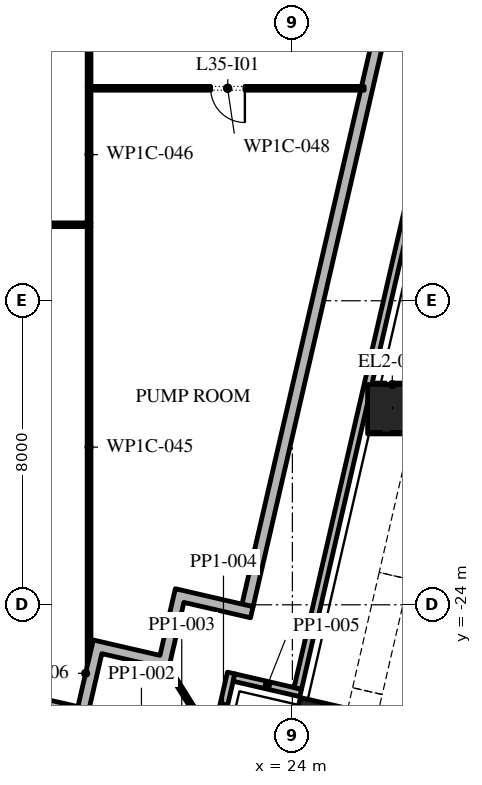
"""IFC4 building model, lengths in metres.
Left out: names, types, materials, properties, quantities, classifications, styles, units other than length and angle.
Written with IfcOpenShell. Run it as: python <this file> out.ifc"""

import sys

from ifc_helpers import new_model, si_unit, direction, frame, frame_2d, origin, origin_2d, place, context, subcontext, project, spatial, polyline, rectangle, outline, extrude, element, fill, save


model = new_model("IFC4")
c1 = context("Model", 3, precision=1e-05, world=origin(), true_north=direction((0.0, 1.0)))
c2 = subcontext(c1, "Body", "Model", "MODEL_VIEW")
j1 = project(units=[si_unit("LENGTHUNIT", "METRE"), si_unit("PLANEANGLEUNIT", "RADIAN")], contexts=[c1])
p1 = place(None, origin())
s1 = spatial("IfcSite", under=j1, at=p1, CompositionType="ELEMENT")
p2 = place(p1, origin())
s2 = spatial("IfcBuilding", under=s1, at=p2, CompositionType="ELEMENT")
p3 = place(p2, frame((0.0, 0.0, 160.2)))
s3 = spatial("IfcBuildingStorey", under=s2, at=p3, CompositionType="ELEMENT", Elevation=160.2)
p4 = place(p3, frame((24.698, -27.22, 0.0), z_axis=(0.0, 0.0, 1.0), x_axis=(0.974370064785, -0.224951054344, 0.0)))
e1 = element("IfcColumn", 1, at=p4, inside=s3, PredefinedType="COLUMN", context=c2, shape_type="SweptSolid", body=[
    extrude(rectangle(XDim=1.3, YDim=1.3, at=origin_2d()), origin(), (0.0, 0.0, 1.0), 5.4),
])
p5 = place(p3, frame((26.629, -18.853, 0.0), z_axis=(0.002893196118, 0.012657733016, 0.999915702052), x_axis=(-0.974858506572, 0.222824801502, 0.0)))
e2 = element("IfcColumn", 2, at=p5, inside=s3, PredefinedType="COLUMN", context=c2, shape_type="SweptSolid", body=[
    extrude(rectangle(XDim=1.3, YDim=1.3, at=origin_2d()), origin(), (0.0, 0.0, 1.0), 5.401),
])
p6 = place(p3, frame((-31.078, -15.421, 0.0), z_axis=(0.0, 0.0, 1.0), x_axis=(0.974370456532, -0.224949357493, 0.0)))
e3 = element("IfcWall", 3, at=p6, inside=s3, PredefinedType="STANDARD", context=c2, shape_type="SweptSolid", body=[
    extrude(rectangle(XDim=51.0, YDim=0.3, at=frame_2d((25.5, 0.0))), origin(), (0.0, 0.0, 1.0), 4.95),
])
p7 = place(p6, frame((10.725, 0.0, 0.6)))
e4 = element("IfcOpeningElement", 4, at=p7, cuts=e3, PredefinedType="OPENING", context=c2, shape_type="SweptSolid", body=[
    extrude(rectangle(XDim=3.6, YDim=3.25, at=frame_2d((1.8, 1.625))), frame((0.0, 0.16, 0.0), z_axis=(0.0, -1.0, 0.0), x_axis=(1.0, 0.0, 0.0)), (0.0, 0.0, 1.0), 0.32),
])
p8 = place(p6, frame((44.925, 0.0, 0.6)))
e5 = element("IfcOpeningElement", 5, at=p8, cuts=e3, PredefinedType="OPENING", context=c2, shape_type="SweptSolid", body=[
    extrude(rectangle(XDim=3.6, YDim=3.9, at=frame_2d((1.8, 1.95))), frame((0.0, 0.16, 0.0), z_axis=(0.0, -1.0, 0.0), x_axis=(1.0, 0.0, 0.0)), (0.0, 0.0, 1.0), 0.32),
])
p9 = place(p3, frame((22.82, -24.016, 0.0), z_axis=(0.0, 0.0, 1.0), x_axis=(0.224953880882, 0.974369412223, 0.0)))
e6 = element("IfcWall", 6, at=p9, inside=s3, PredefinedType="STANDARD", context=c2, shape_type="SweptSolid", body=[
    extrude(rectangle(XDim=49.5, YDim=0.3, at=frame_2d((24.75, 0.0))), origin(), (0.0, 0.0, 1.0), 4.95),
])
p10 = place(p9, frame((15.686, 0.0, 0.6)))
e7 = element("IfcOpeningElement", 7, at=p10, cuts=e6, PredefinedType="OPENING", context=c2, shape_type="SweptSolid", body=[
    extrude(rectangle(XDim=3.6, YDim=3.9, at=frame_2d((1.8, 1.95))), frame((0.0, 0.16, 0.0), z_axis=(0.0, -1.0, 0.0), x_axis=(1.0, 0.0, 0.0)), (0.0, 0.0, 1.0), 0.32),
])
p11 = place(p9, frame((22.8, 0.0, 0.6)))
e8 = element("IfcOpeningElement", 8, at=p11, cuts=e6, PredefinedType="OPENING", context=c2, shape_type="SweptSolid", body=[
    extrude(rectangle(XDim=3.6, YDim=3.9, at=frame_2d((1.8, 1.95))), frame((0.0, 0.16, 0.0), z_axis=(0.0, -1.0, 0.0), x_axis=(1.0, 0.0, 0.0)), (0.0, 0.0, 1.0), 0.32),
])
p12 = place(p9, frame((29.914, 0.0, 0.6)))
e9 = element("IfcOpeningElement", 9, at=p12, cuts=e6, PredefinedType="OPENING", context=c2, shape_type="SweptSolid", body=[
    extrude(rectangle(XDim=3.6, YDim=3.9, at=frame_2d((1.8, 1.95))), frame((0.0, 0.16, 0.0), z_axis=(0.0, -1.0, 0.0), x_axis=(1.0, 0.0, 0.0)), (0.0, 0.0, 1.0), 0.32),
])
p13 = place(p3, origin())
e10 = element("IfcWall", 10, at=p13, inside=s3, PredefinedType="STANDARD", context=c2, shape_type="SweptSolid", body=[
    extrude(outline(polyline([(20.515, -25.331), (20.92, -23.577), (22.967, -24.049), (22.899, -24.342), (21.145, -23.937), (20.74, -25.691), (18.986, -25.286), (18.649, -26.747), (18.357, -26.68), (18.762, -24.926), (20.515, -25.331)])), origin(), (0.0, 0.0, 1.0), 4.95),
])
p14 = place(p3, frame((-33.261, -16.744, -0.05), z_axis=(0.0, 0.0, 1.0), x_axis=(0.974370602864, -0.224948723658, 0.0)))
e11 = element("IfcWall", 11, at=p14, inside=s3, PredefinedType="STANDARD", context=c2, shape_type="SweptSolid", body=[
    extrude(rectangle(XDim=54.56, YDim=0.2, at=frame_2d((27.28, 0.0))), origin(), (0.0, 0.0, 1.0), 1.1),
])
for number, where, z_axis, x_axis in (
    (12, (21.984, -27.548, -0.05), (0.0, 0.0, 1.0), (0.225, 0.974, 0.0)),
    (13, (22.464, -25.914, -0.05), (0.0, 0.0, 1.0), (0.974, -0.225, 0.0)),
):
    element("IfcWall", number, at=place(p3, frame(where, z_axis=z_axis, x_axis=x_axis)), inside=s3, PredefinedType="STANDARD", context=c2, shape_type="SweptSolid", body=[
        extrude(rectangle(XDim=1.8, YDim=0.2, at=frame_2d((0.9, 0.0))), origin(), (0.0, 0.0, 1.0), 1.1),
    ])
p15 = place(p3, frame((24.143, -26.199, -0.05), z_axis=(0.0, 0.0, 1.0), x_axis=(0.224952358158, 0.974369763775, 0.0)))
e14 = element("IfcWall", 14, at=p15, inside=s3, PredefinedType="STANDARD", context=c2, shape_type="SweptSolid", body=[
    extrude(rectangle(XDim=58.569, YDim=0.2, at=frame_2d((29.285, 0.0))), origin(), (0.0, 0.0, 1.0), 1.1),
])
p16 = place(p3, frame((20.74, -25.691, -0.05), z_axis=(0.0, 0.0, 1.0), x_axis=(0.529972121605, -0.848015064914, 0.0)))
e15 = element("IfcWall", 15, at=p16, inside=s3, PredefinedType="STANDARD", context=c2, shape_type="SweptSolid", body=[
    extrude(rectangle(XDim=2.455, YDim=0.1, at=frame_2d((1.228, 0.0))), origin(), (0.0, 0.0, 1.0), 5.0),
])
p17 = place(p3, frame((6.39, -14.0, 0.0), z_axis=(0.0, 0.0, 1.0), x_axis=(1.0, 0.0, 0.0)))
e16 = element("IfcWall", 16, at=p17, inside=s3, PredefinedType="PARTITIONING", context=c2, shape_type="SweptSolid", body=[
    extrude(rectangle(XDim=12.31, YDim=0.1, at=frame_2d((6.155, 0.0))), origin(), (0.0, 0.0, 1.0), 4.95),
])
p18 = place(p17, frame((8.15, 0.0, 0.0)))
e17 = element("IfcOpeningElement", 17, at=p18, cuts=e16, PredefinedType="OPENING", context=c2, shape_type="SweptSolid", body=[
    extrude(rectangle(XDim=0.9, YDim=2.1, at=frame_2d((0.45, 1.05))), frame((0.0, 0.06, 0.0), z_axis=(0.0, -1.0, 0.0), x_axis=(1.0, 0.0, 0.0)), (0.0, 0.0, 1.0), 0.12),
])
p19 = place(p3, frame((18.65, -25.654, 0.0), z_axis=(0.0, 0.0, 1.0), x_axis=(0.0, 1.0, 0.0)))
e18 = element("IfcWall", 18, at=p19, inside=s3, PredefinedType="PARTITIONING", context=c2, shape_type="SweptSolid", body=[
    extrude(rectangle(XDim=11.604, YDim=0.1, at=frame_2d((5.802, 0.0))), origin(), (0.0, 0.0, 1.0), 4.95),
])
p20 = place(p3, frame((18.65, -13.95, 0.0), z_axis=(0.0, 0.0, 1.0), x_axis=(0.0, 1.0, 0.0)))
e19 = element("IfcWall", 19, at=p20, inside=s3, PredefinedType="PARTITIONING", context=c2, shape_type="SweptSolid", body=[
    extrude(rectangle(XDim=3.59, YDim=0.1, at=frame_2d((1.795, 0.0))), origin(), (0.0, 0.0, 1.0), 4.95),
])
p21 = place(p3, frame((18.65, -10.36, 0.0), z_axis=(0.0, 0.0, 1.0), x_axis=(0.0, 1.0, 0.0)))
e20 = element("IfcWall", 20, at=p21, inside=s3, PredefinedType="PARTITIONING", context=c2, shape_type="SweptSolid", body=[
    extrude(rectangle(XDim=2.735, YDim=0.1, at=frame_2d((1.368, 0.0))), origin(), (0.0, 0.0, 1.0), 4.95),
])
p22 = place(p3, frame((18.7, -10.41, 0.0), z_axis=(0.0, 0.0, 1.0), x_axis=(1.0, 0.0, 0.0)))
e21 = element("IfcWall", 21, at=p22, inside=s3, PredefinedType="PARTITIONING", context=c2, shape_type="SweptSolid", body=[
    extrude(rectangle(XDim=7.19, YDim=0.1, at=frame_2d((3.595, 0.0))), origin(), (0.0, 0.0, 1.0), 4.95),
])
p23 = place(p22, frame((3.15, 0.0, 0.0)))
e22 = element("IfcOpeningElement", 22, at=p23, cuts=e21, PredefinedType="OPENING", context=c2, shape_type="SweptSolid", body=[
    extrude(rectangle(XDim=0.9, YDim=2.1, at=frame_2d((0.45, 1.05))), frame((0.0, 0.06, 0.0), z_axis=(0.0, -1.0, 0.0), x_axis=(1.0, 0.0, 0.0)), (0.0, 0.0, 1.0), 0.12),
])
p24 = place(p23, frame((0.9, 0.0, 0.0), z_axis=(0.0, 0.0, 1.0), x_axis=(-1.0, 0.0, 0.0)))
e23 = element("IfcDoor", 23, at=p24, inside=s3, OperationType="SINGLE_SWING_RIGHT", PredefinedType="DOOR", context=c2, shape_type="SweptSolid", body=[
    extrude(rectangle(XDim=0.9, YDim=2.1, at=frame_2d((0.45, 1.05))), frame((0.0, 0.025, 0.0), z_axis=(0.0, -1.0, 0.0), x_axis=(1.0, 0.0, 0.0)), (0.0, 0.0, 1.0), 0.05),
])
fill(e22, e23)
save(model, sys.argv[1])
